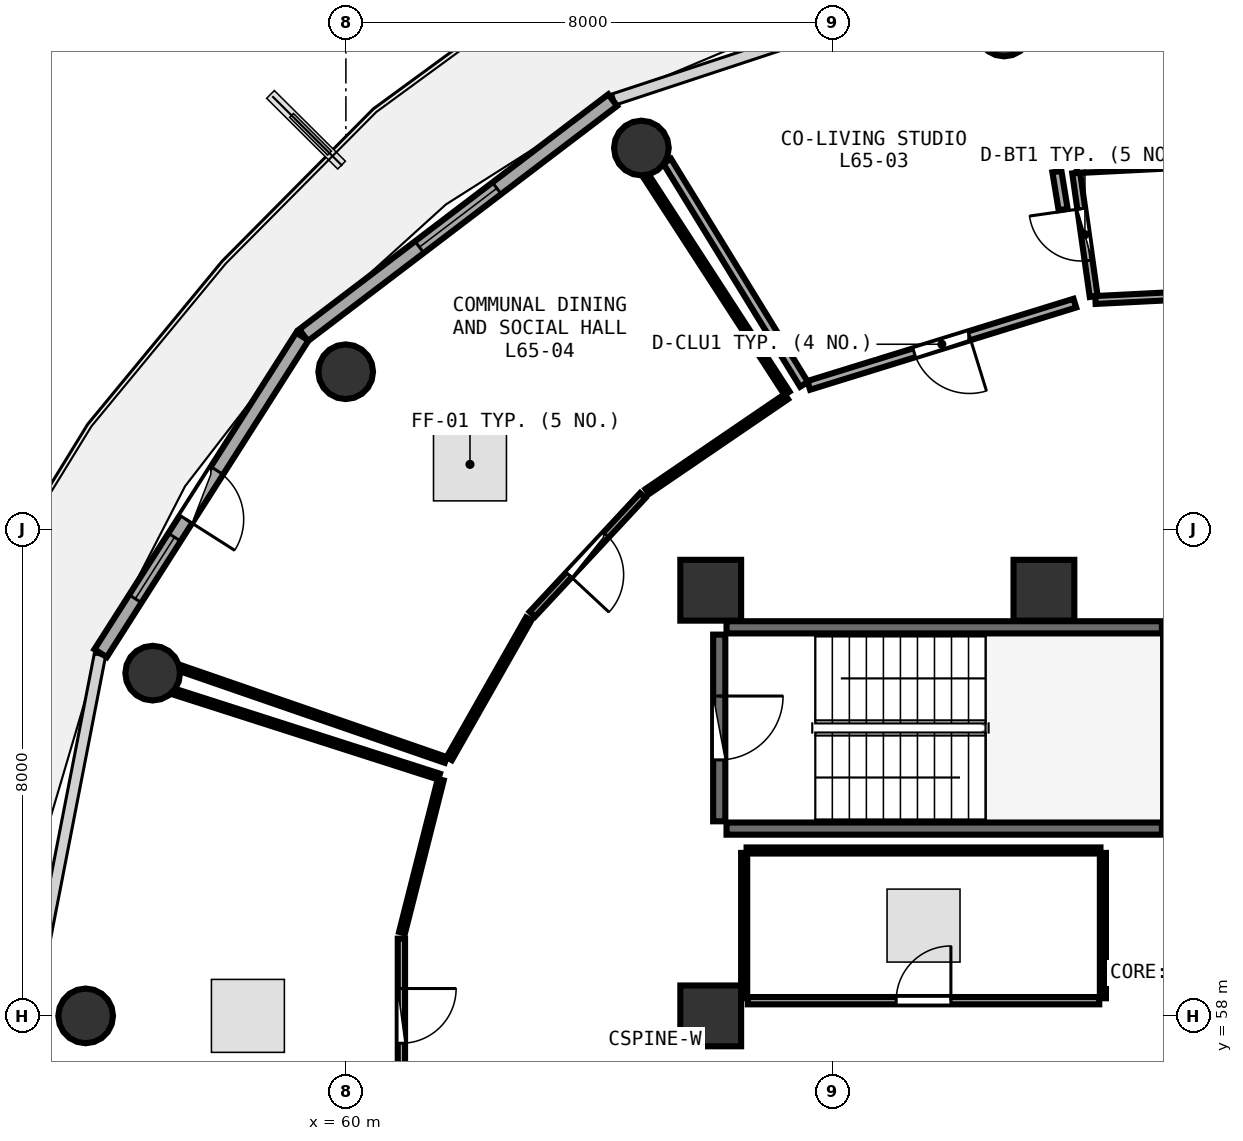
"""IFC4 building model, lengths in metres.
Left out: names, types, materials, properties, quantities, classifications, styles, units other than length and angle.
Written with IfcOpenShell. Run it as: python <this file> out.ifc"""

import sys

from ifc_helpers import new_model, si_unit, direction, frame, frame_2d, origin, origin_2d, place, context, subcontext, project, spatial, rectangle, circle, extrude, element, fill, save


model = new_model("IFC4")
c1 = context("Model", 3, precision=1e-05, world=origin(), true_north=direction((0.0, 1.0)))
c2 = subcontext(c1, "Body", "Model", "MODEL_VIEW")
j1 = project(units=[si_unit("LENGTHUNIT", "METRE"), si_unit("PLANEANGLEUNIT", "RADIAN")], contexts=[c1])
p1 = place(None, origin())
s1 = spatial("IfcSite", under=j1, at=p1, CompositionType="ELEMENT")
p2 = place(p1, origin())
s2 = spatial("IfcBuilding", under=s1, at=p2, CompositionType="ELEMENT")
p3 = place(p2, frame((0.0, 0.0, 256.2)))
s3 = spatial("IfcBuildingStorey", under=s2, at=p3, CompositionType="ELEMENT", Elevation=256.2)
for number, where, z_axis, x_axis in (
    (1, (71.48, 65.0, 0.0), (0.0, 0.0, 1.0), (1.0, 0.0, 0.0)),
    (2, (66.0, 65.0, 0.0), (0.0, 0.0, 1.0), (1.0, 0.0, 0.0)),
    (3, (66.0, 58.0, 0.0), (0.0, 0.0, 1.0), (1.0, 0.0, 0.0)),
):
    element("IfcColumn", number, at=place(p3, frame(where, z_axis=z_axis, x_axis=x_axis)), inside=s3, PredefinedType="PILASTER", context=c2, shape_type="SweptSolid", body=[
        extrude(rectangle(XDim=1.0, YDim=1.0, at=origin_2d()), origin(), (0.0, 0.0, 1.0), 3.75),
    ])
for number, where, z_axis, x_axis in (
    (4, (70.826, 74.229, 0.0), (0.0, 0.0, 1.0), (1.0, 0.0, 0.0)),
    (5, (64.86, 72.272, 0.0), (0.0, 0.0, 1.0), (1.0, 0.0, 0.0)),
    (6, (59.997, 68.593, 0.0), (0.0, 0.0, 1.0), (1.0, 0.0, 0.0)),
    (7, (56.823, 63.636, 0.0), (0.0, 0.0, 1.0), (1.0, 0.0, 0.0)),
    (8, (55.72, 58.0, 0.0), (0.0, 0.0, 1.0), (1.0, 0.0, 0.0)),
):
    element("IfcColumn", number, at=place(p3, frame(where, z_axis=z_axis, x_axis=x_axis)), inside=s3, PredefinedType="COLUMN", context=c2, shape_type="SweptSolid", body=[
        extrude(circle(Radius=0.45, at=origin_2d()), origin(), (0.0, 0.0, 1.0), 3.75),
    ])
p4 = place(p3, frame((64.388, 73.06, 0.0), z_axis=(0.0, 0.0, 1.0), x_axis=(-0.796010444211, -0.605282886514, 0.0)))
e9 = element("IfcWall", 9, at=p4, inside=s3, PredefinedType="SOLIDWALL", context=c2, shape_type="SweptSolid", body=[
    extrude(rectangle(XDim=6.387, YDim=0.24, at=frame_2d((3.194, 0.0))), origin(), (0.0, 0.0, 1.0), 3.475),
])
p5 = place(p4, frame((2.394, 0.0, 0.85)))
e10 = element("IfcOpeningElement", 10, at=p5, cuts=e9, PredefinedType="OPENING", context=c2, shape_type="SweptSolid", body=[
    extrude(rectangle(XDim=1.6, YDim=1.45, at=frame_2d((0.8, 0.725))), frame((0.0, 0.13, 0.0), z_axis=(0.0, -1.0, 0.0), x_axis=(1.0, 0.0, 0.0)), (0.0, 0.0, 1.0), 0.26),
])
p6 = place(p3, frame((59.284, 69.172, 0.0), z_axis=(0.0, 0.0, 1.0), x_axis=(-0.537271968456, -0.843409053728, 0.0)))
e11 = element("IfcWall", 11, at=p6, inside=s3, PredefinedType="SOLIDWALL", context=c2, shape_type="SweptSolid", body=[
    extrude(rectangle(XDim=6.175, YDim=0.24, at=frame_2d((3.087, 0.0))), origin(), (0.0, 0.0, 1.0), 3.475),
])
p7 = place(p6, frame((2.613, 0.0, 0.0)))
e12 = element("IfcOpeningElement", 12, at=p7, cuts=e11, PredefinedType="OPENING", context=c2, shape_type="SweptSolid", body=[
    extrude(rectangle(XDim=0.95, YDim=2.1, at=frame_2d((0.475, 1.05))), frame((0.0, 0.13, 0.0), z_axis=(0.0, -1.0, 0.0), x_axis=(1.0, 0.0, 0.0)), (0.0, 0.0, 1.0), 0.26),
])
p8 = place(p6, frame((3.913, 0.0, 0.85)))
e13 = element("IfcOpeningElement", 13, at=p8, cuts=e11, PredefinedType="OPENING", context=c2, shape_type="SweptSolid", body=[
    extrude(rectangle(XDim=1.2, YDim=1.45, at=frame_2d((0.6, 0.725))), frame((0.0, 0.13, 0.0), z_axis=(0.0, -1.0, 0.0), x_axis=(1.0, 0.0, 0.0)), (0.0, 0.0, 1.0), 0.26),
])
p9 = place(p3, frame((54.803, 57.985, 0.0), z_axis=(0.0, 0.0, 1.0), x_axis=(0.190969309115, -0.981596008028, 0.0)))
e14 = element("IfcWall", 14, at=p9, inside=s3, PredefinedType="SOLIDWALL", context=c2, shape_type="SweptSolid", body=[
    extrude(rectangle(XDim=6.033, YDim=0.24, at=frame_2d((3.017, 0.0))), origin(), (0.0, 0.0, 1.0), 3.475),
])
p10 = place(p9, frame((2.216, 0.0, 0.85)))
e15 = element("IfcOpeningElement", 15, at=p10, cuts=e14, PredefinedType="OPENING", context=c2, shape_type="SweptSolid", body=[
    extrude(rectangle(XDim=1.6, YDim=1.45, at=frame_2d((0.8, 0.725))), frame((0.0, 0.13, 0.0), z_axis=(0.0, -1.0, 0.0), x_axis=(1.0, 0.0, 0.0)), (0.0, 0.0, 1.0), 0.26),
])
p11 = place(p3, frame((66.26, 61.08, 0.0), z_axis=(0.0, 0.0, 1.0), x_axis=(1.0, 0.0, 0.0)))
e16 = element("IfcWall", 16, at=p11, inside=s3, PredefinedType="SHEAR", context=c2, shape_type="SweptSolid", body=[
    extrude(rectangle(XDim=7.16, YDim=0.2, at=frame_2d((3.58, 0.0))), origin(), (0.0, 0.0, 1.0), 3.49),
])
p12 = place(p3, frame((73.54, 61.2, 0.0), z_axis=(0.0, 0.0, 1.0), x_axis=(0.0, 1.0, 0.0)))
e17 = element("IfcWall", 17, at=p12, inside=s3, PredefinedType="SHEAR", context=c2, shape_type="SweptSolid", body=[
    extrude(rectangle(XDim=3.07, YDim=0.2, at=frame_2d((1.535, 0.0))), origin(), (0.0, 0.0, 1.0), 3.49),
])
p13 = place(p3, frame((73.42, 64.39, 0.0), z_axis=(0.0, 0.0, 1.0), x_axis=(-1.0, 0.0, 0.0)))
e18 = element("IfcWall", 18, at=p13, inside=s3, PredefinedType="SHEAR", context=c2, shape_type="SweptSolid", body=[
    extrude(rectangle(XDim=7.16, YDim=0.2, at=frame_2d((3.58, 0.0))), origin(), (0.0, 0.0, 1.0), 3.49),
])
p14 = place(p3, frame((66.14, 64.27, 0.0), z_axis=(0.0, 0.0, 1.0), x_axis=(0.0, -1.0, 0.0)))
e19 = element("IfcWall", 19, at=p14, inside=s3, PredefinedType="SHEAR", context=c2, shape_type="SweptSolid", body=[
    extrude(rectangle(XDim=3.07, YDim=0.2, at=frame_2d((1.535, 0.0))), origin(), (0.0, 0.0, 1.0), 3.49),
])
p15 = place(p14, frame((1.01, 0.0, 0.0)))
e20 = element("IfcOpeningElement", 20, at=p15, cuts=e19, PredefinedType="OPENING", context=c2, shape_type="SweptSolid", body=[
    extrude(rectangle(XDim=1.05, YDim=2.1, at=frame_2d((0.525, 1.05))), frame((0.0, 0.11, 0.0), z_axis=(0.0, -1.0, 0.0), x_axis=(1.0, 0.0, 0.0)), (0.0, 0.0, 1.0), 0.22),
])
p16 = place(p3, frame((66.61, 58.25, 0.0), z_axis=(0.0, 0.0, 1.0), x_axis=(1.0, 0.0, 0.0)))
e21 = element("IfcWall", 21, at=p16, inside=s3, PredefinedType="PARTITIONING", context=c2, shape_type="SweptSolid", body=[
    extrude(rectangle(XDim=5.78, YDim=0.12, at=frame_2d((2.89, 0.0))), origin(), (0.0, 0.0, 1.0), 3.48),
])
p17 = place(p16, frame((2.44, 0.0, 0.0)))
e22 = element("IfcOpeningElement", 22, at=p17, cuts=e21, PredefinedType="OPENING", context=c2, shape_type="SweptSolid", body=[
    extrude(rectangle(XDim=0.9, YDim=2.08, at=frame_2d((0.45, 1.04))), frame((0.0, 0.07, 0.0), z_axis=(0.0, -1.0, 0.0), x_axis=(1.0, 0.0, 0.0)), (0.0, 0.0, 1.0), 0.14),
])
p18 = place(p3, frame((72.299, 69.831, 0.0), z_axis=(0.0, 0.0, 1.0), x_axis=(-0.14028943716, 0.990110536163, 0.0)))
e23 = element("IfcWall", 23, at=p18, inside=s3, PredefinedType="PLUMBINGWALL", context=c2, shape_type="SweptSolid", body=[
    extrude(rectangle(XDim=2.053, YDim=0.13, at=frame_2d((1.027, 0.0))), origin(), (0.0, 0.0, 1.0), 3.175),
])
p19 = place(p18, frame((0.597, 0.0, 0.0)))
e24 = element("IfcOpeningElement", 24, at=p19, cuts=e23, PredefinedType="OPENING", context=c2, shape_type="SweptSolid", body=[
    extrude(rectangle(XDim=0.86, YDim=2.05, at=frame_2d((0.43, 1.025))), frame((0.0, 0.075, 0.0), z_axis=(0.0, -1.0, 0.0), x_axis=(1.0, 0.0, 0.0)), (0.0, 0.0, 1.0), 0.15),
])
p20 = place(p3, frame((71.989, 69.721, 0.0), z_axis=(0.0, 0.0, 1.0), x_axis=(-0.955414123224, -0.295269119863, 0.0)))
e25 = element("IfcWall", 25, at=p20, inside=s3, PredefinedType="PARTITIONING", context=c2, shape_type="SweptSolid", body=[
    extrude(rectangle(XDim=4.581, YDim=0.15, at=frame_2d((2.291, 0.0))), origin(), (0.0, 0.0, 1.0), 3.075),
])
p21 = place(p20, frame((1.815, 0.0, 0.0)))
e26 = element("IfcOpeningElement", 26, at=p21, cuts=e25, PredefinedType="OPENING", context=c2, shape_type="SweptSolid", body=[
    extrude(rectangle(XDim=0.95, YDim=2.08, at=frame_2d((0.475, 1.04))), frame((0.0, 0.085, 0.0), z_axis=(0.0, -1.0, 0.0), x_axis=(1.0, 0.0, 0.0)), (0.0, 0.0, 1.0), 0.17),
])
p22 = place(p3, frame((64.882, 66.557, 0.0), z_axis=(0.0, 0.0, 1.0), x_axis=(-0.681315269885, -0.731990097625, 0.0)))
e27 = element("IfcWall", 27, at=p22, inside=s3, PredefinedType="PARTITIONING", context=c2, shape_type="SweptSolid", body=[
    extrude(rectangle(XDim=2.664, YDim=0.12, at=frame_2d((1.332, 0.0))), origin(), (0.0, 0.0, 1.0), 3.075),
])
p23 = place(p22, frame((0.882, 0.0, 0.0)))
e28 = element("IfcOpeningElement", 28, at=p23, cuts=e27, PredefinedType="OPENING", context=c2, shape_type="SweptSolid", body=[
    extrude(rectangle(XDim=0.9, YDim=2.08, at=frame_2d((0.45, 1.04))), frame((0.0, 0.07, 0.0), z_axis=(0.0, -1.0, 0.0), x_axis=(1.0, 0.0, 0.0)), (0.0, 0.0, 1.0), 0.14),
])
p24 = place(p3, frame((60.913, 59.27, 0.0), z_axis=(0.0, 0.0, 1.0), x_axis=(0.0, -1.0, 0.0)))
e29 = element("IfcWall", 29, at=p24, inside=s3, PredefinedType="PARTITIONING", context=c2, shape_type="SweptSolid", body=[
    extrude(rectangle(XDim=2.54, YDim=0.12, at=frame_2d((1.27, 0.0))), origin(), (0.0, 0.0, 1.0), 3.075),
])
p25 = place(p24, frame((0.82, 0.0, 0.0)))
e30 = element("IfcOpeningElement", 30, at=p25, cuts=e29, PredefinedType="OPENING", context=c2, shape_type="SweptSolid", body=[
    extrude(rectangle(XDim=0.9, YDim=2.08, at=frame_2d((0.45, 1.04))), frame((0.0, 0.07, 0.0), z_axis=(0.0, -1.0, 0.0), x_axis=(1.0, 0.0, 0.0)), (0.0, 0.0, 1.0), 0.14),
])
p26 = place(p3, frame((72.45, 58.29, 0.0), z_axis=(0.0, 0.0, 1.0), x_axis=(0.0, 1.0, 0.0)))
e31 = element("IfcWall", 31, at=p26, inside=s3, PredefinedType="PARTITIONING", context=c2, shape_type="SweptSolid", body=[
    extrude(rectangle(XDim=2.39, YDim=0.1, at=frame_2d((1.195, 0.0))), origin(), (0.0, 0.0, 1.0), 3.48),
])
p27 = place(p3, frame((72.41, 60.72, 0.0), z_axis=(0.0, 0.0, 1.0), x_axis=(-1.0, 0.0, 0.0)))
e32 = element("IfcWall", 32, at=p27, inside=s3, PredefinedType="PARTITIONING", context=c2, shape_type="SweptSolid", body=[
    extrude(rectangle(XDim=5.82, YDim=0.1, at=frame_2d((2.91, 0.0))), origin(), (0.0, 0.0, 1.0), 3.48),
])
p28 = place(p3, frame((66.55, 60.68, 0.0), z_axis=(0.0, 0.0, 1.0), x_axis=(0.0, -1.0, 0.0)))
e33 = element("IfcWall", 33, at=p28, inside=s3, PredefinedType="PARTITIONING", context=c2, shape_type="SweptSolid", body=[
    extrude(rectangle(XDim=2.39, YDim=0.1, at=frame_2d((1.195, 0.0))), origin(), (0.0, 0.0, 1.0), 3.48),
])
p29 = place(p3, frame((74.2, 69.867, 0.0), z_axis=(0.0, 0.0, 1.0), x_axis=(-0.998743232436, -0.050119414036, 0.0)))
e34 = element("IfcWall", 34, at=p29, inside=s3, PredefinedType="PLUMBINGWALL", context=c2, shape_type="SweptSolid", body=[
    extrude(rectangle(XDim=1.875, YDim=0.13, at=frame_2d((0.938, 0.0))), origin(), (0.0, 0.0, 1.0), 3.48),
])
p30 = place(p3, frame((72.022, 71.925, 0.0), z_axis=(0.0, 0.0, 1.0), x_axis=(0.998726159472, 0.050458481805, 0.0)))
e35 = element("IfcWall", 35, at=p30, inside=s3, PredefinedType="PLUMBINGWALL", context=c2, shape_type="SweptSolid", body=[
    extrude(rectangle(XDim=2.221, YDim=0.13, at=frame_2d((1.11, 0.0))), origin(), (0.0, 0.0, 1.0), 3.48),
])
p31 = place(p3, frame((67.534, 68.385, 0.0), z_axis=(0.0, 0.0, 1.0), x_axis=(-0.522784059663, 0.852465147066, 0.0)))
e36 = element("IfcWall", 36, at=p31, inside=s3, PredefinedType="PARTITIONING", context=c2, shape_type="SweptSolid", body=[
    extrude(rectangle(XDim=4.306, YDim=0.15, at=frame_2d((2.153, 0.0))), origin(), (0.0, 0.0, 1.0), 3.175),
])
p32 = place(p3, frame((71.694, 71.885, 0.0), z_axis=(0.0, 0.0, 1.0), x_axis=(0.162139500997, -0.986767846161, 0.0)))
e37 = element("IfcWall", 37, at=p32, inside=s3, PredefinedType="PARTITIONING", context=c2, shape_type="SweptSolid", body=[
    extrude(rectangle(XDim=0.631, YDim=0.15, at=frame_2d((0.315, 0.0))), origin(), (0.0, 0.0, 1.0), 3.48),
])
p33 = place(p3, frame((67.243, 68.184, 0.0), z_axis=(0.0, 0.0, 1.0), x_axis=(-0.826087380575, -0.563542047814, 0.0)))
e38 = element("IfcWall", 38, at=p33, inside=s3, PredefinedType="PARTITIONING", context=c2, shape_type="SweptSolid", body=[
    extrude(rectangle(XDim=2.768, YDim=0.1, at=frame_2d((1.384, 0.0))), origin(), (0.0, 0.0, 1.0), 3.075),
])
p34 = place(p3, frame((63.006, 64.528, 0.0), z_axis=(0.0, 0.0, 1.0), x_axis=(-0.494277588427, -0.869304127207, 0.0)))
e39 = element("IfcWall", 39, at=p34, inside=s3, PredefinedType="PARTITIONING", context=c2, shape_type="SweptSolid", body=[
    extrude(rectangle(XDim=2.643, YDim=0.1, at=frame_2d((1.322, 0.0))), origin(), (0.0, 0.0, 1.0), 3.075),
])
p35 = place(p3, frame((61.642, 62.209, 0.0), z_axis=(0.0, 0.0, 1.0), x_axis=(-0.945103281494, 0.326771766388, 0.0)))
e40 = element("IfcWall", 40, at=p35, inside=s3, PredefinedType="PARTITIONING", context=c2, shape_type="SweptSolid", body=[
    extrude(rectangle(XDim=4.604, YDim=0.1, at=frame_2d((2.302, 0.0))), origin(), (0.0, 0.0, 1.0), 3.075),
])
p36 = place(p3, frame((64.942, 71.804, 0.0), z_axis=(0.0, 0.0, 1.0), x_axis=(0.544234825024, -0.838932926539, 0.0)))
e41 = element("IfcWall", 41, at=p36, inside=s3, PredefinedType="PARTITIONING", context=c2, shape_type="SweptSolid", body=[
    extrude(rectangle(XDim=4.249, YDim=0.1, at=frame_2d((2.125, 0.0))), origin(), (0.0, 0.0, 1.0), 3.075),
])
p37 = place(p3, frame((61.56, 61.884, 0.0), z_axis=(0.0, 0.0, 1.0), x_axis=(-0.245655775867, -0.969357127061, 0.0)))
e42 = element("IfcWall", 42, at=p37, inside=s3, PredefinedType="PARTITIONING", context=c2, shape_type="SweptSolid", body=[
    extrude(rectangle(XDim=2.595, YDim=0.1, at=frame_2d((1.297, 0.0))), origin(), (0.0, 0.0, 1.0), 3.48),
])
p38 = place(p3, frame((57.184, 63.329, 0.0), z_axis=(0.0, 0.0, 1.0), x_axis=(0.95227750557, -0.305233602976, 0.0)))
e43 = element("IfcWall", 43, at=p38, inside=s3, PredefinedType="PARTITIONING", context=c2, shape_type="SweptSolid", body=[
    extrude(rectangle(XDim=4.565, YDim=0.1, at=frame_2d((2.283, 0.0))), origin(), (0.0, 0.0, 1.0), 3.175),
])
p39 = place(p5, origin())
e44 = element("IfcWindow", 44, at=p39, inside=s3, PartitioningType="SINGLE_PANEL", PredefinedType="WINDOW", context=c2, shape_type="SweptSolid", body=[
    extrude(rectangle(XDim=1.6, YDim=1.45, at=frame_2d((0.8, 0.725))), frame((0.0, 0.03, 0.0), z_axis=(0.0, -1.0, 0.0), x_axis=(1.0, 0.0, 0.0)), (0.0, 0.0, 1.0), 0.06),
])
fill(e10, e44)
p40 = place(p7, frame((0.95, 0.0, 0.0), z_axis=(0.0, 0.0, 1.0), x_axis=(-1.0, 0.0, 0.0)))
e45 = element("IfcDoor", 45, at=p40, inside=s3, OperationType="SINGLE_SWING_LEFT", PredefinedType="DOOR", context=c2, shape_type="SweptSolid", body=[
    extrude(rectangle(XDim=0.95, YDim=2.1, at=frame_2d((0.475, 1.05))), frame((0.0, 0.025, 0.0), z_axis=(0.0, -1.0, 0.0), x_axis=(1.0, 0.0, 0.0)), (0.0, 0.0, 1.0), 0.05),
])
fill(e12, e45)
p41 = place(p8, origin())
e46 = element("IfcWindow", 46, at=p41, inside=s3, PartitioningType="SINGLE_PANEL", PredefinedType="WINDOW", context=c2, shape_type="SweptSolid", body=[
    extrude(rectangle(XDim=1.2, YDim=1.45, at=frame_2d((0.6, 0.725))), frame((0.0, 0.03, 0.0), z_axis=(0.0, -1.0, 0.0), x_axis=(1.0, 0.0, 0.0)), (0.0, 0.0, 1.0), 0.06),
])
fill(e13, e46)
p42 = place(p15, origin())
e47 = element("IfcDoor", 47, at=p42, inside=s3, OperationType="SINGLE_SWING_LEFT", PredefinedType="DOOR", context=c2, shape_type="SweptSolid", body=[
    extrude(rectangle(XDim=1.05, YDim=2.1, at=frame_2d((0.525, 1.05))), frame((0.0, 0.025, 0.0), z_axis=(0.0, -1.0, 0.0), x_axis=(1.0, 0.0, 0.0)), (0.0, 0.0, 1.0), 0.05),
])
fill(e20, e47)
p43 = place(p17, origin())
e48 = element("IfcDoor", 48, at=p43, inside=s3, OperationType="SINGLE_SWING_RIGHT", PredefinedType="DOOR", context=c2, shape_type="SweptSolid", body=[
    extrude(rectangle(XDim=0.9, YDim=2.08, at=frame_2d((0.45, 1.04))), frame((0.0, 0.025, 0.0), z_axis=(0.0, -1.0, 0.0), x_axis=(1.0, 0.0, 0.0)), (0.0, 0.0, 1.0), 0.05),
])
fill(e22, e48)
p44 = place(p19, origin())
e49 = element("IfcDoor", 49, at=p44, inside=s3, OperationType="SINGLE_SWING_RIGHT", PredefinedType="DOOR", context=c2, shape_type="SweptSolid", body=[
    extrude(rectangle(XDim=0.86, YDim=2.05, at=frame_2d((0.43, 1.025))), frame((0.0, 0.025, 0.0), z_axis=(0.0, -1.0, 0.0), x_axis=(1.0, 0.0, 0.0)), (0.0, 0.0, 1.0), 0.05),
])
fill(e24, e49)
p45 = place(p21, origin())
e50 = element("IfcDoor", 50, at=p45, inside=s3, OperationType="SINGLE_SWING_LEFT", PredefinedType="DOOR", context=c2, shape_type="SweptSolid", body=[
    extrude(rectangle(XDim=0.95, YDim=2.08, at=frame_2d((0.475, 1.04))), frame((0.0, 0.025, 0.0), z_axis=(0.0, -1.0, 0.0), x_axis=(1.0, 0.0, 0.0)), (0.0, 0.0, 1.0), 0.05),
])
fill(e26, e50)
p46 = place(p23, origin())
e51 = element("IfcDoor", 51, at=p46, inside=s3, OperationType="SINGLE_SWING_RIGHT", PredefinedType="DOOR", context=c2, shape_type="SweptSolid", body=[
    extrude(rectangle(XDim=0.9, YDim=2.08, at=frame_2d((0.45, 1.04))), frame((0.0, 0.025, 0.0), z_axis=(0.0, -1.0, 0.0), x_axis=(1.0, 0.0, 0.0)), (0.0, 0.0, 1.0), 0.05),
])
fill(e28, e51)
p47 = place(p25, origin())
e52 = element("IfcDoor", 52, at=p47, inside=s3, OperationType="SINGLE_SWING_LEFT", PredefinedType="DOOR", context=c2, shape_type="SweptSolid", body=[
    extrude(rectangle(XDim=0.9, YDim=2.08, at=frame_2d((0.45, 1.04))), frame((0.0, 0.025, 0.0), z_axis=(0.0, -1.0, 0.0), x_axis=(1.0, 0.0, 0.0)), (0.0, 0.0, 1.0), 0.05),
])
fill(e30, e52)
save(model, sys.argv[1])
